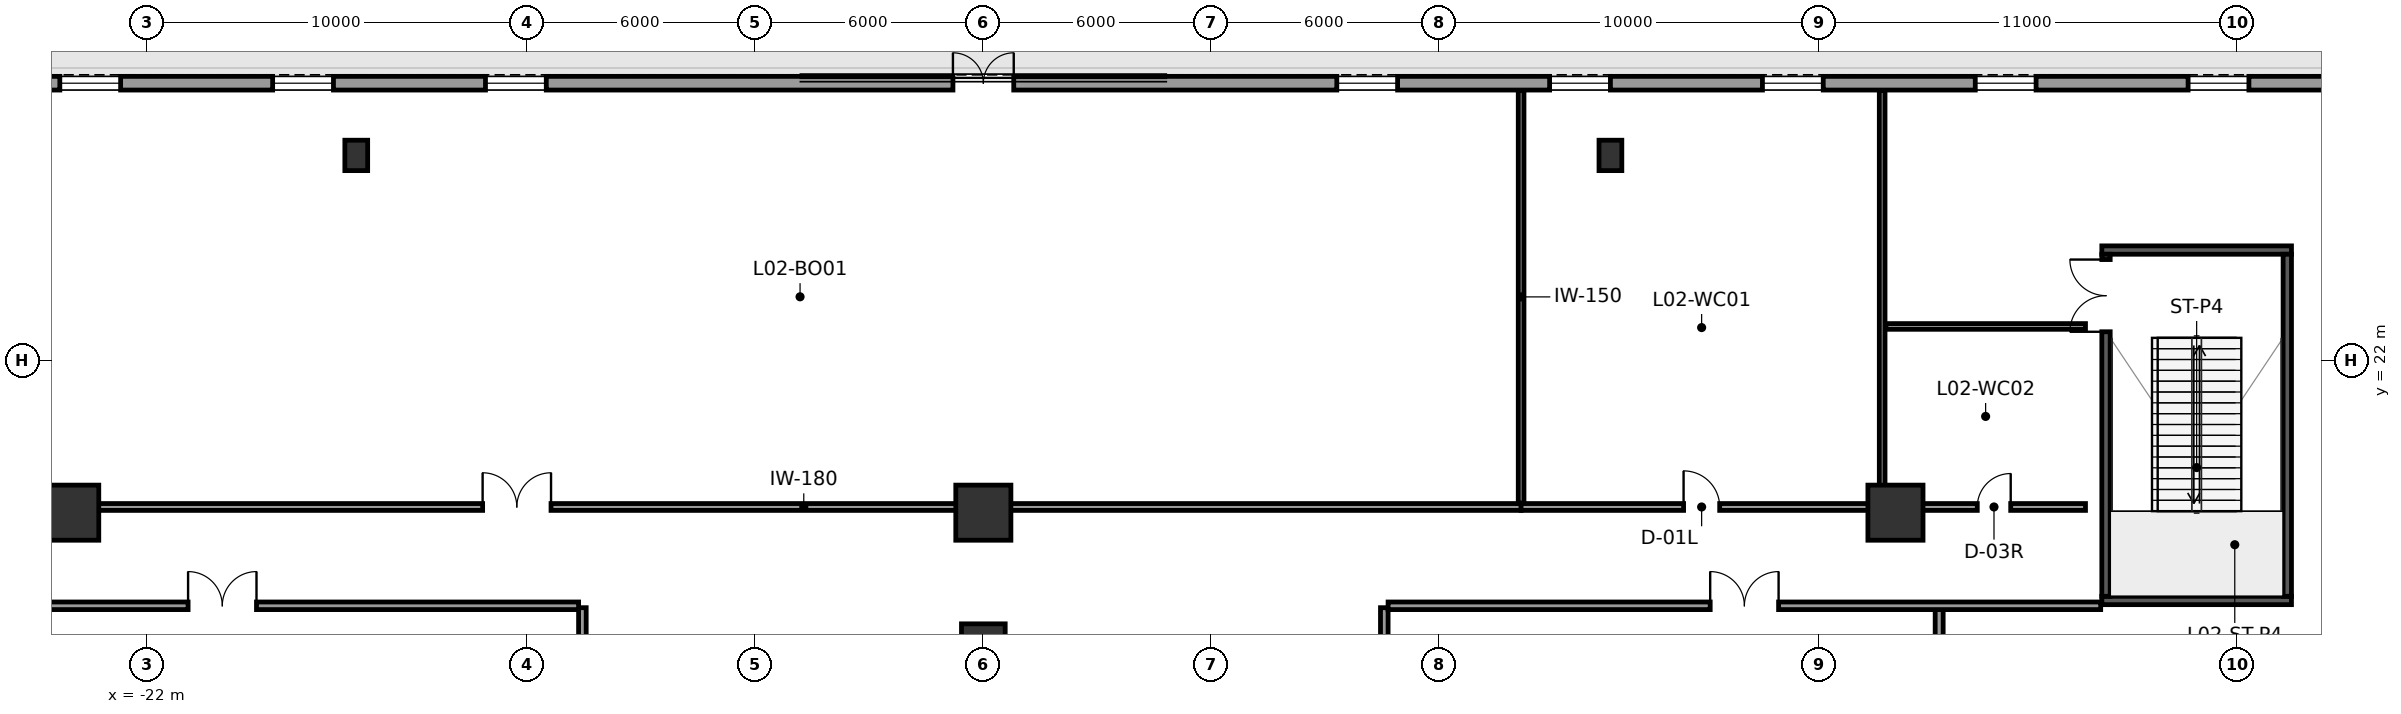
"""IFC4 building model, lengths in metres.
Left out: names, types, materials, properties, quantities, classifications, styles, units other than length and angle.
Written with IfcOpenShell. Run it as: python <this file> out.ifc"""

import sys

from ifc_helpers import new_model, si_unit, direction, frame, frame_2d, origin, origin_2d, place, context, subcontext, project, spatial, rectangle, hollow_rectangle, extrude, element, fill, save


model = new_model("IFC4")
c1 = context("Model", 3, precision=1e-05, world=origin(), true_north=direction((0.0, 1.0)))
c2 = subcontext(c1, "Body", "Model", "MODEL_VIEW")
j1 = project(units=[si_unit("LENGTHUNIT", "METRE"), si_unit("PLANEANGLEUNIT", "RADIAN")], contexts=[c1])
p1 = place(None, origin())
s1 = spatial("IfcSite", under=j1, at=p1, CompositionType="ELEMENT")
p2 = place(p1, origin())
s2 = spatial("IfcBuilding", under=s1, at=p2, CompositionType="ELEMENT")
p3 = place(p2, frame((0.0, 0.0, 11.5)))
s3 = spatial("IfcBuildingStorey", under=s2, at=p3, CompositionType="ELEMENT", Elevation=11.5)
p4 = place(p3, frame((0.0, 14.5, 0.0), z_axis=(0.0, 0.0, 1.0), x_axis=(1.0, 0.0, 0.0)))
e1 = element("IfcColumn", 1, at=p4, inside=s3, PredefinedType="COLUMN", context=c2, shape_type="SweptSolid", body=[
    extrude(rectangle(XDim=1.15, YDim=1.15, at=origin_2d()), origin(), (0.0, 0.0, 1.0), 6.0),
])
for number, where, z_axis, x_axis in (
    (2, (-24.0, 18.0, 0.0), (0.0, 0.0, 1.0), (1.0, 0.0, 0.0)),
    (3, (24.0, 18.0, 0.0), (0.0, 0.0, 1.0), (1.0, 0.0, 0.0)),
    (4, (0.0, 18.0, 0.0), (0.0, 0.0, 1.0), (1.0, 0.0, 0.0)),
):
    element("IfcColumn", number, at=place(p3, frame(where, z_axis=z_axis, x_axis=x_axis)), inside=s3, PredefinedType="COLUMN", context=c2, shape_type="SweptSolid", body=[
        extrude(rectangle(XDim=1.45, YDim=1.45, at=origin_2d()), origin(), (0.0, 0.0, 1.0), 6.0),
    ])
for number, where, z_axis, x_axis in (
    (5, (-16.5, 27.4, 0.0), (0.0, 0.0, 1.0), (1.0, 0.0, 0.0)),
    (6, (16.5, 27.4, 0.0), (0.0, 0.0, 1.0), (1.0, 0.0, 0.0)),
):
    element("IfcColumn", number, at=place(p3, frame(where, z_axis=z_axis, x_axis=x_axis)), inside=s3, PredefinedType="COLUMN", context=c2, shape_type="SweptSolid", body=[
        extrude(hollow_rectangle(XDim=0.6, YDim=0.8, WallThickness=0.05, at=origin_2d()), origin(), (0.0, 0.0, 1.0), 6.0),
    ])
p5 = place(p3, frame((-40.3, 29.3, 0.0), z_axis=(0.0, 0.0, 1.0), x_axis=(1.0, 0.0, 0.0)))
e7 = element("IfcWall", 7, at=p5, inside=s3, PredefinedType="STANDARD", context=c2, shape_type="SweptSolid", body=[
    extrude(rectangle(XDim=80.6, YDim=0.36, at=frame_2d((40.3, 0.0))), origin(), (0.0, 0.0, 1.0), 5.7),
])
p6 = place(p5, frame((39.5, 0.0, 0.0)))
e8 = element("IfcOpeningElement", 8, at=p6, cuts=e7, PredefinedType="OPENING", context=c2, shape_type="SweptSolid", body=[
    extrude(rectangle(XDim=1.6, YDim=2.2, at=frame_2d((0.8, 1.1))), frame((0.0, 0.19, 0.0), z_axis=(0.0, -1.0, 0.0), x_axis=(1.0, 0.0, 0.0)), (0.0, 0.0, 1.0), 0.38),
])
p7 = place(p5, frame((4.8, 0.0, 0.9)))
e9 = element("IfcOpeningElement", 9, at=p7, cuts=e7, PredefinedType="OPENING", context=c2, shape_type="SweptSolid", body=[
    extrude(rectangle(XDim=1.6, YDim=2.6, at=frame_2d((0.8, 1.3))), frame((0.0, 0.19, 0.0), z_axis=(0.0, -1.0, 0.0), x_axis=(1.0, 0.0, 0.0)), (0.0, 0.0, 1.0), 0.38),
])
p8 = place(p5, frame((10.4, 0.0, 0.9)))
e10 = element("IfcOpeningElement", 10, at=p8, cuts=e7, PredefinedType="OPENING", context=c2, shape_type="SweptSolid", body=[
    extrude(rectangle(XDim=1.6, YDim=2.6, at=frame_2d((0.8, 1.3))), frame((0.0, 0.19, 0.0), z_axis=(0.0, -1.0, 0.0), x_axis=(1.0, 0.0, 0.0)), (0.0, 0.0, 1.0), 0.38),
])
p9 = place(p5, frame((16.0, 0.0, 0.9)))
e11 = element("IfcOpeningElement", 11, at=p9, cuts=e7, PredefinedType="OPENING", context=c2, shape_type="SweptSolid", body=[
    extrude(rectangle(XDim=1.6, YDim=2.6, at=frame_2d((0.8, 1.3))), frame((0.0, 0.19, 0.0), z_axis=(0.0, -1.0, 0.0), x_axis=(1.0, 0.0, 0.0)), (0.0, 0.0, 1.0), 0.38),
])
p10 = place(p5, frame((21.6, 0.0, 0.9)))
e12 = element("IfcOpeningElement", 12, at=p10, cuts=e7, PredefinedType="OPENING", context=c2, shape_type="SweptSolid", body=[
    extrude(rectangle(XDim=1.6, YDim=2.6, at=frame_2d((0.8, 1.3))), frame((0.0, 0.19, 0.0), z_axis=(0.0, -1.0, 0.0), x_axis=(1.0, 0.0, 0.0)), (0.0, 0.0, 1.0), 0.38),
])
p11 = place(p5, frame((27.2, 0.0, 0.9)))
e13 = element("IfcOpeningElement", 13, at=p11, cuts=e7, PredefinedType="OPENING", context=c2, shape_type="SweptSolid", body=[
    extrude(rectangle(XDim=1.6, YDim=2.6, at=frame_2d((0.8, 1.3))), frame((0.0, 0.19, 0.0), z_axis=(0.0, -1.0, 0.0), x_axis=(1.0, 0.0, 0.0)), (0.0, 0.0, 1.0), 0.38),
])
p12 = place(p5, frame((49.6, 0.0, 0.9)))
e14 = element("IfcOpeningElement", 14, at=p12, cuts=e7, PredefinedType="OPENING", context=c2, shape_type="SweptSolid", body=[
    extrude(rectangle(XDim=1.6, YDim=2.6, at=frame_2d((0.8, 1.3))), frame((0.0, 0.19, 0.0), z_axis=(0.0, -1.0, 0.0), x_axis=(1.0, 0.0, 0.0)), (0.0, 0.0, 1.0), 0.38),
])
p13 = place(p5, frame((55.2, 0.0, 0.9)))
e15 = element("IfcOpeningElement", 15, at=p13, cuts=e7, PredefinedType="OPENING", context=c2, shape_type="SweptSolid", body=[
    extrude(rectangle(XDim=1.6, YDim=2.6, at=frame_2d((0.8, 1.3))), frame((0.0, 0.19, 0.0), z_axis=(0.0, -1.0, 0.0), x_axis=(1.0, 0.0, 0.0)), (0.0, 0.0, 1.0), 0.38),
])
p14 = place(p5, frame((60.8, 0.0, 0.9)))
e16 = element("IfcOpeningElement", 16, at=p14, cuts=e7, PredefinedType="OPENING", context=c2, shape_type="SweptSolid", body=[
    extrude(rectangle(XDim=1.6, YDim=2.6, at=frame_2d((0.8, 1.3))), frame((0.0, 0.19, 0.0), z_axis=(0.0, -1.0, 0.0), x_axis=(1.0, 0.0, 0.0)), (0.0, 0.0, 1.0), 0.38),
])
p15 = place(p5, frame((66.4, 0.0, 0.9)))
e17 = element("IfcOpeningElement", 17, at=p15, cuts=e7, PredefinedType="OPENING", context=c2, shape_type="SweptSolid", body=[
    extrude(rectangle(XDim=1.6, YDim=2.6, at=frame_2d((0.8, 1.3))), frame((0.0, 0.19, 0.0), z_axis=(0.0, -1.0, 0.0), x_axis=(1.0, 0.0, 0.0)), (0.0, 0.0, 1.0), 0.38),
])
p16 = place(p5, frame((72.0, 0.0, 0.9)))
e18 = element("IfcOpeningElement", 18, at=p16, cuts=e7, PredefinedType="OPENING", context=c2, shape_type="SweptSolid", body=[
    extrude(rectangle(XDim=1.6, YDim=2.6, at=frame_2d((0.8, 1.3))), frame((0.0, 0.19, 0.0), z_axis=(0.0, -1.0, 0.0), x_axis=(1.0, 0.0, 0.0)), (0.0, 0.0, 1.0), 0.38),
])
for number, where, z_axis, x_axis in (
    (19, (29.43, 15.69, 0.0), (0.0, 0.0, 1.0), (1.0, 0.0, 0.0)),
    (20, (29.43, 24.91, 0.0), (0.0, 0.0, 1.0), (1.0, 0.0, 0.0)),
):
    element("IfcWall", number, at=place(p3, frame(where, z_axis=z_axis, x_axis=x_axis)), inside=s3, PredefinedType="SHEAR", context=c2, shape_type="SweptSolid", body=[
        extrude(rectangle(XDim=4.99, YDim=0.22, at=frame_2d((2.495, 0.0))), origin(), (0.0, 0.0, 1.0), 5.7),
    ])
p17 = place(p3, frame((29.54, 15.8, 0.0), z_axis=(0.0, 0.0, 1.0), x_axis=(0.0, 1.0, 0.0)))
e21 = element("IfcWall", 21, at=p17, inside=s3, PredefinedType="SHEAR", context=c2, shape_type="SweptSolid", body=[
    extrude(rectangle(XDim=9.0, YDim=0.22, at=frame_2d((4.5, 0.0))), origin(), (0.0, 0.0, 1.0), 5.7),
])
p18 = place(p17, frame((6.96, 0.0, 0.0)))
e22 = element("IfcOpeningElement", 22, at=p18, cuts=e21, PredefinedType="OPENING", context=c2, shape_type="SweptSolid", body=[
    extrude(rectangle(XDim=1.9, YDim=2.2, at=frame_2d((0.95, 1.1))), frame((0.0, 0.12, 0.0), z_axis=(0.0, -1.0, 0.0), x_axis=(1.0, 0.0, 0.0)), (0.0, 0.0, 1.0), 0.24),
])
p19 = place(p3, frame((34.31, 15.8, 0.0), z_axis=(0.0, 0.0, 1.0), x_axis=(0.0, 1.0, 0.0)))
e23 = element("IfcWall", 23, at=p19, inside=s3, PredefinedType="SHEAR", context=c2, shape_type="SweptSolid", body=[
    extrude(rectangle(XDim=9.0, YDim=0.22, at=frame_2d((4.5, 0.0))), origin(), (0.0, 0.0, 1.0), 5.7),
])
p20 = place(p3, frame((-10.55, -15.5, 0.0), z_axis=(0.0, 0.0, 1.0), x_axis=(0.0, 1.0, 0.0)))
e24 = element("IfcWall", 24, at=p20, inside=s3, PredefinedType="PARTITIONING", context=c2, shape_type="SweptSolid", body=[
    extrude(rectangle(XDim=31.0, YDim=0.2, at=frame_2d((15.5, 0.0))), origin(), (0.0, 0.0, 1.0), 5.7),
])
p21 = place(p20, frame((14.6, 0.0, 0.0)))
e25 = element("IfcOpeningElement", 25, at=p21, cuts=e24, PredefinedType="OPENING", context=c2, shape_type="SweptSolid", body=[
    extrude(rectangle(XDim=1.8, YDim=2.2, at=frame_2d((0.9, 1.1))), frame((0.0, 0.11, 0.0), z_axis=(0.0, -1.0, 0.0), x_axis=(1.0, 0.0, 0.0)), (0.0, 0.0, 1.0), 0.22),
])
p22 = place(p3, frame((10.55, -3.05, 0.0), z_axis=(0.0, 0.0, 1.0), x_axis=(0.0, 1.0, 0.0)))
e26 = element("IfcWall", 26, at=p22, inside=s3, PredefinedType="PARTITIONING", context=c2, shape_type="SweptSolid", body=[
    extrude(rectangle(XDim=18.55, YDim=0.2, at=frame_2d((9.275, 0.0))), origin(), (0.0, 0.0, 1.0), 5.7),
])
p23 = place(p22, frame((8.375, 0.0, 0.0)))
e27 = element("IfcOpeningElement", 27, at=p23, cuts=e26, PredefinedType="OPENING", context=c2, shape_type="SweptSolid", body=[
    extrude(rectangle(XDim=1.8, YDim=2.2, at=frame_2d((0.9, 1.1))), frame((0.0, 0.11, 0.0), z_axis=(0.0, -1.0, 0.0), x_axis=(1.0, 0.0, 0.0)), (0.0, 0.0, 1.0), 0.22),
])
p24 = place(p3, frame((25.15, -2.95, 0.0), z_axis=(0.0, 0.0, 1.0), x_axis=(0.0, 1.0, 0.0)))
e28 = element("IfcWall", 28, at=p24, inside=s3, PredefinedType="MOVABLE", context=c2, shape_type="SweptSolid", body=[
    extrude(rectangle(XDim=18.45, YDim=0.21, at=frame_2d((9.225, 0.0))), origin(), (0.0, 0.0, 1.0), 5.7),
])
p25 = place(p24, frame((8.325, 0.0, 0.0)))
e29 = element("IfcOpeningElement", 29, at=p25, cuts=e28, PredefinedType="OPENING", context=c2, shape_type="SweptSolid", body=[
    extrude(rectangle(XDim=1.8, YDim=2.2, at=frame_2d((0.9, 1.1))), frame((0.0, 0.115, 0.0), z_axis=(0.0, -1.0, 0.0), x_axis=(1.0, 0.0, 0.0)), (0.0, 0.0, 1.0), 0.23),
])
p26 = place(p3, frame((-29.4, 15.55, 0.0), z_axis=(0.0, 0.0, 1.0), x_axis=(1.0, 0.0, 0.0)))
e30 = element("IfcWall", 30, at=p26, inside=s3, PredefinedType="PARTITIONING", context=c2, shape_type="SweptSolid", body=[
    extrude(rectangle(XDim=18.75, YDim=0.2, at=frame_2d((9.375, 0.0))), origin(), (0.0, 0.0, 1.0), 5.7),
])
p27 = place(p26, frame((8.475, 0.0, 0.0)))
e31 = element("IfcOpeningElement", 31, at=p27, cuts=e30, PredefinedType="OPENING", context=c2, shape_type="SweptSolid", body=[
    extrude(rectangle(XDim=1.8, YDim=2.2, at=frame_2d((0.9, 1.1))), frame((0.0, 0.11, 0.0), z_axis=(0.0, -1.0, 0.0), x_axis=(1.0, 0.0, 0.0)), (0.0, 0.0, 1.0), 0.22),
])
p28 = place(p3, frame((10.65, 15.55, 0.0), z_axis=(0.0, 0.0, 1.0), x_axis=(1.0, 0.0, 0.0)))
e32 = element("IfcWall", 32, at=p28, inside=s3, PredefinedType="PARTITIONING", context=c2, shape_type="SweptSolid", body=[
    extrude(rectangle(XDim=18.75, YDim=0.2, at=frame_2d((9.375, 0.0))), origin(), (0.0, 0.0, 1.0), 5.7),
])
p29 = place(p28, frame((8.475, 0.0, 0.0)))
e33 = element("IfcOpeningElement", 33, at=p29, cuts=e32, PredefinedType="OPENING", context=c2, shape_type="SweptSolid", body=[
    extrude(rectangle(XDim=1.8, YDim=2.2, at=frame_2d((0.9, 1.1))), frame((0.0, 0.11, 0.0), z_axis=(0.0, -1.0, 0.0), x_axis=(1.0, 0.0, 0.0)), (0.0, 0.0, 1.0), 0.22),
])
p30 = place(p3, frame((-23.6, 18.15, 0.0), z_axis=(0.0, 0.0, 1.0), x_axis=(1.0, 0.0, 0.0)))
e34 = element("IfcWall", 34, at=p30, inside=s3, PredefinedType="PARTITIONING", context=c2, shape_type="SweptSolid", body=[
    extrude(rectangle(XDim=37.75, YDim=0.18, at=frame_2d((18.875, 0.0))), origin(), (0.0, 0.0, 1.0), 3.88),
])
p31 = place(p30, frame((10.425, 0.0, 0.0)))
e35 = element("IfcOpeningElement", 35, at=p31, cuts=e34, PredefinedType="OPENING", context=c2, shape_type="SweptSolid", body=[
    extrude(rectangle(XDim=1.8, YDim=2.2, at=frame_2d((0.9, 1.1))), frame((0.0, 0.1, 0.0), z_axis=(0.0, -1.0, 0.0), x_axis=(1.0, 0.0, 0.0)), (0.0, 0.0, 1.0), 0.2),
])
p32 = place(p3, frame((14.15, 18.15, 0.0), z_axis=(0.0, 0.0, 1.0), x_axis=(1.0, 0.0, 0.0)))
e36 = element("IfcWall", 36, at=p32, inside=s3, PredefinedType="PARTITIONING", context=c2, shape_type="SweptSolid", body=[
    extrude(rectangle(XDim=9.5, YDim=0.18, at=frame_2d((4.75, 0.0))), origin(), (0.0, 0.0, 1.0), 3.88),
])
p33 = place(p32, frame((4.275, 0.0, 0.0)))
e37 = element("IfcOpeningElement", 37, at=p33, cuts=e36, PredefinedType="OPENING", context=c2, shape_type="SweptSolid", body=[
    extrude(rectangle(XDim=0.95, YDim=2.15, at=frame_2d((0.475, 1.075))), frame((0.0, 0.1, 0.0), z_axis=(0.0, -1.0, 0.0), x_axis=(1.0, 0.0, 0.0)), (0.0, 0.0, 1.0), 0.2),
])
p34 = place(p3, frame((23.65, 18.15, 0.0), z_axis=(0.0, 0.0, 1.0), x_axis=(1.0, 0.0, 0.0)))
e38 = element("IfcWall", 38, at=p34, inside=s3, PredefinedType="PARTITIONING", context=c2, shape_type="SweptSolid", body=[
    extrude(rectangle(XDim=5.35, YDim=0.18, at=frame_2d((2.675, 0.0))), origin(), (0.0, 0.0, 1.0), 5.7),
])
p35 = place(p34, frame((2.502, 0.0, 0.0)))
e39 = element("IfcOpeningElement", 39, at=p35, cuts=e38, PredefinedType="OPENING", context=c2, shape_type="SweptSolid", body=[
    extrude(rectangle(XDim=0.88, YDim=2.1, at=frame_2d((0.44, 1.05))), frame((0.0, 0.1, 0.0), z_axis=(0.0, -1.0, 0.0), x_axis=(1.0, 0.0, 0.0)), (0.0, 0.0, 1.0), 0.2),
])
for number, where, z_axis, x_axis in (
    (40, (14.15, 18.25, 0.0), (0.0, 0.0, 1.0), (0.0, 1.0, 0.0)),
    (41, (23.65, 18.25, 0.0), (0.0, 0.0, 1.0), (0.0, 1.0, 0.0)),
):
    element("IfcWall", number, at=place(p3, frame(where, z_axis=z_axis, x_axis=x_axis)), inside=s3, PredefinedType="PARTITIONING", context=c2, shape_type="SweptSolid", body=[
        extrude(rectangle(XDim=10.855, YDim=0.15, at=frame_2d((5.427, 0.0))), origin(), (0.0, 0.0, 1.0), 5.7),
    ])
p36 = place(p3, frame((23.75, 22.9, 0.0), z_axis=(0.0, 0.0, 1.0), x_axis=(1.0, 0.0, 0.0)))
e42 = element("IfcWall", 42, at=p36, inside=s3, PredefinedType="PARTITIONING", context=c2, shape_type="SweptSolid", body=[
    extrude(rectangle(XDim=5.25, YDim=0.15, at=frame_2d((2.625, 0.0))), origin(), (0.0, 0.0, 1.0), 5.7),
])
p37 = place(p6, origin())
e43 = element("IfcDoor", 43, at=p37, inside=s3, OperationType="DOUBLE_DOOR_SINGLE_SWING", PredefinedType="DOOR", context=c2, shape_type="SweptSolid", body=[
    extrude(rectangle(XDim=1.6, YDim=2.2, at=frame_2d((0.8, 1.1))), frame((0.0, 0.025, 0.0), z_axis=(0.0, -1.0, 0.0), x_axis=(1.0, 0.0, 0.0)), (0.0, 0.0, 1.0), 0.05),
])
fill(e8, e43)
p38 = place(p9, origin())
e44 = element("IfcWindow", 44, at=p38, inside=s3, PartitioningType="DOUBLE_PANEL_VERTICAL", PredefinedType="WINDOW", context=c2, shape_type="SweptSolid", body=[
    extrude(rectangle(XDim=1.6, YDim=2.6, at=frame_2d((0.8, 1.3))), frame((0.0, 0.03, 0.0), z_axis=(0.0, -1.0, 0.0), x_axis=(1.0, 0.0, 0.0)), (0.0, 0.0, 1.0), 0.06),
])
fill(e11, e44)
p39 = place(p10, origin())
e45 = element("IfcWindow", 45, at=p39, inside=s3, PartitioningType="DOUBLE_PANEL_VERTICAL", PredefinedType="WINDOW", context=c2, shape_type="SweptSolid", body=[
    extrude(rectangle(XDim=1.6, YDim=2.6, at=frame_2d((0.8, 1.3))), frame((0.0, 0.03, 0.0), z_axis=(0.0, -1.0, 0.0), x_axis=(1.0, 0.0, 0.0)), (0.0, 0.0, 1.0), 0.06),
])
fill(e12, e45)
p40 = place(p11, origin())
e46 = element("IfcWindow", 46, at=p40, inside=s3, PartitioningType="DOUBLE_PANEL_VERTICAL", PredefinedType="WINDOW", context=c2, shape_type="SweptSolid", body=[
    extrude(rectangle(XDim=1.6, YDim=2.6, at=frame_2d((0.8, 1.3))), frame((0.0, 0.03, 0.0), z_axis=(0.0, -1.0, 0.0), x_axis=(1.0, 0.0, 0.0)), (0.0, 0.0, 1.0), 0.06),
])
fill(e13, e46)
p41 = place(p12, origin())
e47 = element("IfcWindow", 47, at=p41, inside=s3, PartitioningType="DOUBLE_PANEL_VERTICAL", PredefinedType="WINDOW", context=c2, shape_type="SweptSolid", body=[
    extrude(rectangle(XDim=1.6, YDim=2.6, at=frame_2d((0.8, 1.3))), frame((0.0, 0.03, 0.0), z_axis=(0.0, -1.0, 0.0), x_axis=(1.0, 0.0, 0.0)), (0.0, 0.0, 1.0), 0.06),
])
fill(e14, e47)
p42 = place(p13, origin())
e48 = element("IfcWindow", 48, at=p42, inside=s3, PartitioningType="DOUBLE_PANEL_VERTICAL", PredefinedType="WINDOW", context=c2, shape_type="SweptSolid", body=[
    extrude(rectangle(XDim=1.6, YDim=2.6, at=frame_2d((0.8, 1.3))), frame((0.0, 0.03, 0.0), z_axis=(0.0, -1.0, 0.0), x_axis=(1.0, 0.0, 0.0)), (0.0, 0.0, 1.0), 0.06),
])
fill(e15, e48)
p43 = place(p14, origin())
e49 = element("IfcWindow", 49, at=p43, inside=s3, PartitioningType="DOUBLE_PANEL_VERTICAL", PredefinedType="WINDOW", context=c2, shape_type="SweptSolid", body=[
    extrude(rectangle(XDim=1.6, YDim=2.6, at=frame_2d((0.8, 1.3))), frame((0.0, 0.03, 0.0), z_axis=(0.0, -1.0, 0.0), x_axis=(1.0, 0.0, 0.0)), (0.0, 0.0, 1.0), 0.06),
])
fill(e16, e49)
p44 = place(p15, origin())
e50 = element("IfcWindow", 50, at=p44, inside=s3, PartitioningType="DOUBLE_PANEL_VERTICAL", PredefinedType="WINDOW", context=c2, shape_type="SweptSolid", body=[
    extrude(rectangle(XDim=1.6, YDim=2.6, at=frame_2d((0.8, 1.3))), frame((0.0, 0.03, 0.0), z_axis=(0.0, -1.0, 0.0), x_axis=(1.0, 0.0, 0.0)), (0.0, 0.0, 1.0), 0.06),
])
fill(e17, e50)
p45 = place(p16, origin())
e51 = element("IfcWindow", 51, at=p45, inside=s3, PartitioningType="DOUBLE_PANEL_VERTICAL", PredefinedType="WINDOW", context=c2, shape_type="SweptSolid", body=[
    extrude(rectangle(XDim=1.6, YDim=2.6, at=frame_2d((0.8, 1.3))), frame((0.0, 0.03, 0.0), z_axis=(0.0, -1.0, 0.0), x_axis=(1.0, 0.0, 0.0)), (0.0, 0.0, 1.0), 0.06),
])
fill(e18, e51)
p46 = place(p18, origin())
e52 = element("IfcDoor", 52, at=p46, inside=s3, OperationType="DOUBLE_DOOR_SINGLE_SWING", PredefinedType="DOOR", context=c2, shape_type="SweptSolid", body=[
    extrude(rectangle(XDim=1.9, YDim=2.2, at=frame_2d((0.95, 1.1))), frame((0.0, 0.025, 0.0), z_axis=(0.0, -1.0, 0.0), x_axis=(1.0, 0.0, 0.0)), (0.0, 0.0, 1.0), 0.05),
])
fill(e22, e52)
p47 = place(p27, origin())
e53 = element("IfcDoor", 53, at=p47, inside=s3, OperationType="DOUBLE_DOOR_SINGLE_SWING", PredefinedType="DOOR", context=c2, shape_type="SweptSolid", body=[
    extrude(rectangle(XDim=1.8, YDim=2.2, at=frame_2d((0.9, 1.1))), frame((0.0, 0.025, 0.0), z_axis=(0.0, -1.0, 0.0), x_axis=(1.0, 0.0, 0.0)), (0.0, 0.0, 1.0), 0.05),
])
fill(e31, e53)
p48 = place(p29, origin())
e54 = element("IfcDoor", 54, at=p48, inside=s3, OperationType="DOUBLE_DOOR_SINGLE_SWING", PredefinedType="DOOR", context=c2, shape_type="SweptSolid", body=[
    extrude(rectangle(XDim=1.8, YDim=2.2, at=frame_2d((0.9, 1.1))), frame((0.0, 0.025, 0.0), z_axis=(0.0, -1.0, 0.0), x_axis=(1.0, 0.0, 0.0)), (0.0, 0.0, 1.0), 0.05),
])
fill(e33, e54)
p49 = place(p31, origin())
e55 = element("IfcDoor", 55, at=p49, inside=s3, OperationType="DOUBLE_DOOR_SINGLE_SWING", PredefinedType="DOOR", context=c2, shape_type="SweptSolid", body=[
    extrude(rectangle(XDim=1.8, YDim=2.2, at=frame_2d((0.9, 1.1))), frame((0.0, 0.025, 0.0), z_axis=(0.0, -1.0, 0.0), x_axis=(1.0, 0.0, 0.0)), (0.0, 0.0, 1.0), 0.05),
])
fill(e35, e55)
p50 = place(p33, origin())
e56 = element("IfcDoor", 56, at=p50, inside=s3, OperationType="SINGLE_SWING_LEFT", PredefinedType="DOOR", context=c2, shape_type="SweptSolid", body=[
    extrude(rectangle(XDim=0.95, YDim=2.15, at=frame_2d((0.475, 1.075))), frame((0.0, 0.025, 0.0), z_axis=(0.0, -1.0, 0.0), x_axis=(1.0, 0.0, 0.0)), (0.0, 0.0, 1.0), 0.05),
])
fill(e37, e56)
p51 = place(p35, origin())
e57 = element("IfcDoor", 57, at=p51, inside=s3, OperationType="SINGLE_SWING_RIGHT", PredefinedType="DOOR", context=c2, shape_type="SweptSolid", body=[
    extrude(rectangle(XDim=0.88, YDim=2.1, at=frame_2d((0.44, 1.05))), frame((0.0, 0.025, 0.0), z_axis=(0.0, -1.0, 0.0), x_axis=(1.0, 0.0, 0.0)), (0.0, 0.0, 1.0), 0.05),
])
fill(e39, e57)
save(model, sys.argv[1])
